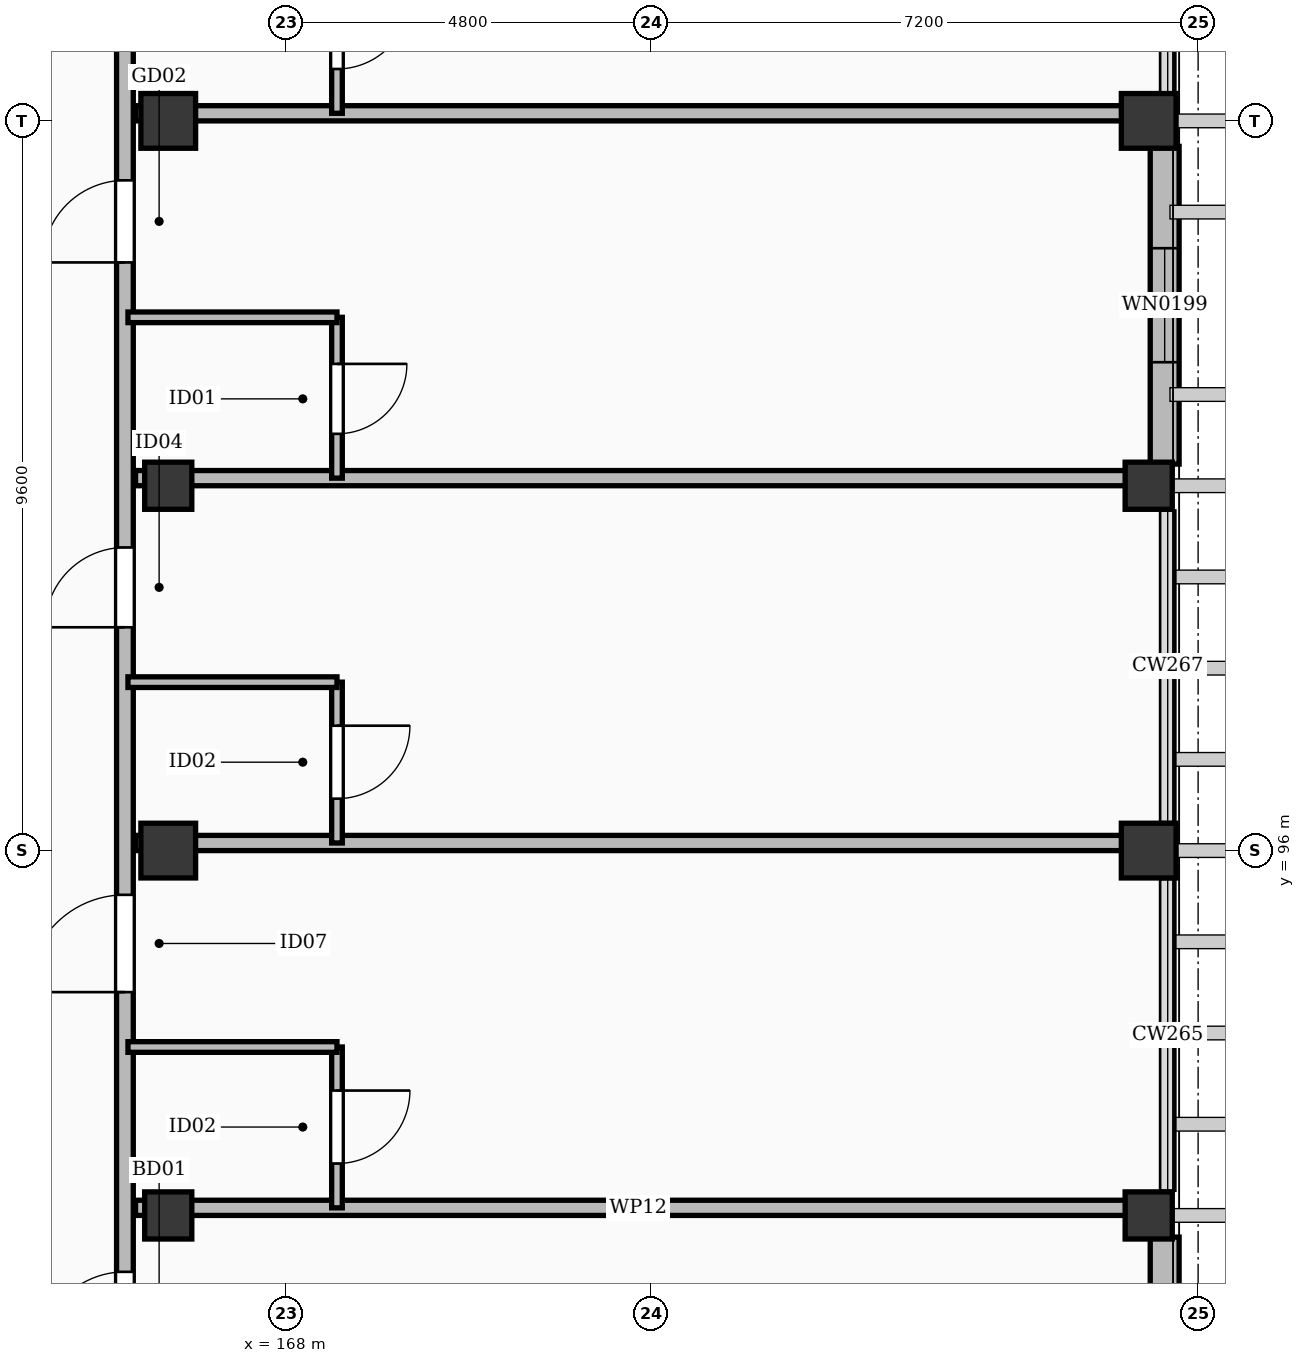
"""IFC4 building model, lengths in metres.
Left out: names, types, materials, properties, quantities, classifications, styles, units other than length and angle.
Written with IfcOpenShell. Run it as: python <this file> out.ifc"""

import sys

from ifc_helpers import new_model, si_unit, direction, frame, frame_2d, origin, origin_2d, place, context, subcontext, project, spatial, rectangle, extrude, element, fill, save


model = new_model("IFC4")
c1 = context("Model", 3, precision=1e-05, world=origin(), true_north=direction((0.0, 1.0)))
c2 = subcontext(c1, "Body", "Model", "MODEL_VIEW")
j1 = project(units=[si_unit("LENGTHUNIT", "METRE"), si_unit("PLANEANGLEUNIT", "RADIAN")], contexts=[c1])
p1 = place(None, origin())
s1 = spatial("IfcSite", under=j1, at=p1, CompositionType="ELEMENT")
p2 = place(p1, origin())
s2 = spatial("IfcBuilding", under=s1, at=p2, CompositionType="ELEMENT")
p3 = place(p2, frame((0.0, 0.0, 31.8)))
s3 = spatial("IfcBuildingStorey", under=s2, at=p3, CompositionType="ELEMENT", Elevation=31.8)
for number, where, z_axis, x_axis in (
    (1, (166.45, 96.0, 0.0), (0.0, 0.0, 1.0), (1.0, 0.0, 0.0)),
    (2, (166.45, 105.6, 0.0), (0.0, 0.0, 1.0), (1.0, 0.0, 0.0)),
    (3, (179.35, 96.0, 0.0), (0.0, 0.0, 1.0), (1.0, 0.0, 0.0)),
    (4, (179.35, 105.6, 0.0), (0.0, 0.0, 1.0), (1.0, 0.0, 0.0)),
):
    element("IfcColumn", number, at=place(p3, frame(where, z_axis=z_axis, x_axis=x_axis)), inside=s3, PredefinedType="COLUMN", context=c2, shape_type="SweptSolid", body=[
        extrude(rectangle(XDim=0.72, YDim=0.72, at=origin_2d()), origin(), (0.0, 0.0, 1.0), 3.6),
    ])
for number, where, z_axis, x_axis in (
    (5, (166.45, 91.2, 0.0), (0.0, 0.0, 1.0), (1.0, 0.0, 0.0)),
    (6, (166.45, 100.8, 0.0), (0.0, 0.0, 1.0), (1.0, 0.0, 0.0)),
    (7, (179.35, 91.2, 0.0), (0.0, 0.0, 1.0), (1.0, 0.0, 0.0)),
    (8, (179.35, 100.8, 0.0), (0.0, 0.0, 1.0), (1.0, 0.0, 0.0)),
):
    element("IfcColumn", number, at=place(p3, frame(where, z_axis=z_axis, x_axis=x_axis)), inside=s3, PredefinedType="COLUMN", context=c2, shape_type="SweptSolid", body=[
        extrude(rectangle(XDim=0.62, YDim=0.62, at=origin_2d()), origin(), (0.0, 0.0, 1.0), 3.6),
    ])
p4 = place(p3, frame((179.56, 90.915, 0.0), z_axis=(0.0, 0.0, 1.0), x_axis=(0.0, -1.0, 0.0)))
e9 = element("IfcWall", 9, at=p4, inside=s3, PredefinedType="SOLIDWALL", context=c2, shape_type="SweptSolid", body=[
    extrude(rectangle(XDim=4.18, YDim=0.38, at=frame_2d((2.09, 0.0))), origin(), (0.0, 0.0, 1.0), 2.602),
])
p5 = place(p4, frame((1.54, 0.0, 0.55)))
e10 = element("IfcOpeningElement", 10, at=p5, cuts=e9, PredefinedType="OPENING", context=c2, shape_type="SweptSolid", body=[
    extrude(rectangle(XDim=1.1, YDim=1.7, at=frame_2d((0.55, 0.85))), frame((0.0, 0.202, 0.0), z_axis=(0.0, -1.0, 0.0), x_axis=(1.0, 0.0, 0.0)), (0.0, 0.0, 1.0), 0.404),
])
p6 = place(p3, frame((179.56, 105.265, 0.0), z_axis=(0.0, 0.0, 1.0), x_axis=(0.0, -1.0, 0.0)))
e11 = element("IfcWall", 11, at=p6, inside=s3, PredefinedType="SOLIDWALL", context=c2, shape_type="SweptSolid", body=[
    extrude(rectangle(XDim=4.18, YDim=0.38, at=frame_2d((2.09, 0.0))), origin(), (0.0, 0.0, 1.0), 2.602),
])
p7 = place(p6, frame((1.34, 0.0, 0.55)))
e12 = element("IfcOpeningElement", 12, at=p7, cuts=e11, PredefinedType="OPENING", context=c2, shape_type="SweptSolid", body=[
    extrude(rectangle(XDim=1.5, YDim=1.74, at=frame_2d((0.75, 0.87))), frame((0.0, 0.202, 0.0), z_axis=(0.0, -1.0, 0.0), x_axis=(1.0, 0.0, 0.0)), (0.0, 0.0, 1.0), 0.404),
])
p8 = place(p3, frame((165.88, 48.35, 0.0), z_axis=(0.0, 0.0, 1.0), x_axis=(0.0, 1.0, 0.0)))
e13 = element("IfcWall", 13, at=p8, inside=s3, PredefinedType="PARTITIONING", context=c2, shape_type="SweptSolid", body=[
    extrude(rectangle(XDim=77.3, YDim=0.22, at=frame_2d((38.65, 0.0))), origin(), (0.0, 0.0, 1.0), 2.602),
])
p9 = place(p8, frame((5.15, 0.0, 0.0)))
e14 = element("IfcOpeningElement", 14, at=p9, cuts=e13, PredefinedType="OPENING", context=c2, shape_type="SweptSolid", body=[
    extrude(rectangle(XDim=1.14, YDim=2.26, at=frame_2d((0.57, 1.13))), frame((0.0, 0.122, 0.0), z_axis=(0.0, -1.0, 0.0), x_axis=(1.0, 0.0, 0.0)), (0.0, 0.0, 1.0), 0.244),
])
p10 = place(p8, frame((12.188, 0.0, 0.0)))
e15 = element("IfcOpeningElement", 15, at=p10, cuts=e13, PredefinedType="OPENING", context=c2, shape_type="SweptSolid", body=[
    extrude(rectangle(XDim=1.12, YDim=2.15, at=frame_2d((0.56, 1.075))), frame((0.0, 0.122, 0.0), z_axis=(0.0, -1.0, 0.0), x_axis=(1.0, 0.0, 0.0)), (0.0, 0.0, 1.0), 0.244),
])
p11 = place(p8, frame((16.988, 0.0, 0.0)))
e16 = element("IfcOpeningElement", 16, at=p11, cuts=e13, PredefinedType="OPENING", context=c2, shape_type="SweptSolid", body=[
    extrude(rectangle(XDim=1.28, YDim=2.16, at=frame_2d((0.64, 1.08))), frame((0.0, 0.122, 0.0), z_axis=(0.0, -1.0, 0.0), x_axis=(1.0, 0.0, 0.0)), (0.0, 0.0, 1.0), 0.244),
])
p12 = place(p8, frame((21.788, 0.0, 0.0)))
e17 = element("IfcOpeningElement", 17, at=p12, cuts=e13, PredefinedType="OPENING", context=c2, shape_type="SweptSolid", body=[
    extrude(rectangle(XDim=1.05, YDim=2.18, at=frame_2d((0.525, 1.09))), frame((0.0, 0.122, 0.0), z_axis=(0.0, -1.0, 0.0), x_axis=(1.0, 0.0, 0.0)), (0.0, 0.0, 1.0), 0.244),
])
p13 = place(p8, frame((26.588, 0.0, 0.0)))
e18 = element("IfcOpeningElement", 18, at=p13, cuts=e13, PredefinedType="OPENING", context=c2, shape_type="SweptSolid", body=[
    extrude(rectangle(XDim=1.08, YDim=2.25, at=frame_2d((0.54, 1.125))), frame((0.0, 0.122, 0.0), z_axis=(0.0, -1.0, 0.0), x_axis=(1.0, 0.0, 0.0)), (0.0, 0.0, 1.0), 0.244),
])
p14 = place(p8, frame((31.388, 0.0, 0.0)))
e19 = element("IfcOpeningElement", 19, at=p14, cuts=e13, PredefinedType="OPENING", context=c2, shape_type="SweptSolid", body=[
    extrude(rectangle(XDim=1.02, YDim=2.2, at=frame_2d((0.51, 1.1))), frame((0.0, 0.122, 0.0), z_axis=(0.0, -1.0, 0.0), x_axis=(1.0, 0.0, 0.0)), (0.0, 0.0, 1.0), 0.244),
])
p15 = place(p8, frame((35.838, 0.0, 0.0)))
e20 = element("IfcOpeningElement", 20, at=p15, cuts=e13, PredefinedType="OPENING", context=c2, shape_type="SweptSolid", body=[
    extrude(rectangle(XDim=1.5, YDim=2.3, at=frame_2d((0.75, 1.15))), frame((0.0, 0.122, 0.0), z_axis=(0.0, -1.0, 0.0), x_axis=(1.0, 0.0, 0.0)), (0.0, 0.0, 1.0), 0.244),
])
p16 = place(p8, frame((40.988, 0.0, 0.0)))
e21 = element("IfcOpeningElement", 21, at=p16, cuts=e13, PredefinedType="OPENING", context=c2, shape_type="SweptSolid", body=[
    extrude(rectangle(XDim=1.12, YDim=2.15, at=frame_2d((0.56, 1.075))), frame((0.0, 0.122, 0.0), z_axis=(0.0, -1.0, 0.0), x_axis=(1.0, 0.0, 0.0)), (0.0, 0.0, 1.0), 0.244),
])
p17 = place(p8, frame((45.788, 0.0, 0.0)))
e22 = element("IfcOpeningElement", 22, at=p17, cuts=e13, PredefinedType="OPENING", context=c2, shape_type="SweptSolid", body=[
    extrude(rectangle(XDim=1.28, YDim=2.16, at=frame_2d((0.64, 1.08))), frame((0.0, 0.122, 0.0), z_axis=(0.0, -1.0, 0.0), x_axis=(1.0, 0.0, 0.0)), (0.0, 0.0, 1.0), 0.244),
])
p18 = place(p8, frame((50.588, 0.0, 0.0)))
e23 = element("IfcOpeningElement", 23, at=p18, cuts=e13, PredefinedType="OPENING", context=c2, shape_type="SweptSolid", body=[
    extrude(rectangle(XDim=1.05, YDim=2.18, at=frame_2d((0.525, 1.09))), frame((0.0, 0.122, 0.0), z_axis=(0.0, -1.0, 0.0), x_axis=(1.0, 0.0, 0.0)), (0.0, 0.0, 1.0), 0.244),
])
p19 = place(p8, frame((55.388, 0.0, 0.0)))
e24 = element("IfcOpeningElement", 24, at=p19, cuts=e13, PredefinedType="OPENING", context=c2, shape_type="SweptSolid", body=[
    extrude(rectangle(XDim=1.08, YDim=2.25, at=frame_2d((0.54, 1.125))), frame((0.0, 0.122, 0.0), z_axis=(0.0, -1.0, 0.0), x_axis=(1.0, 0.0, 0.0)), (0.0, 0.0, 1.0), 0.244),
])
p20 = place(p8, frame((60.188, 0.0, 0.0)))
e25 = element("IfcOpeningElement", 25, at=p20, cuts=e13, PredefinedType="OPENING", context=c2, shape_type="SweptSolid", body=[
    extrude(rectangle(XDim=1.02, YDim=2.2, at=frame_2d((0.51, 1.1))), frame((0.0, 0.122, 0.0), z_axis=(0.0, -1.0, 0.0), x_axis=(1.0, 0.0, 0.0)), (0.0, 0.0, 1.0), 0.244),
])
p21 = place(p8, frame((64.638, 0.0, 0.0)))
e26 = element("IfcOpeningElement", 26, at=p21, cuts=e13, PredefinedType="OPENING", context=c2, shape_type="SweptSolid", body=[
    extrude(rectangle(XDim=1.5, YDim=2.3, at=frame_2d((0.75, 1.15))), frame((0.0, 0.122, 0.0), z_axis=(0.0, -1.0, 0.0), x_axis=(1.0, 0.0, 0.0)), (0.0, 0.0, 1.0), 0.244),
])
p22 = place(p8, frame((69.788, 0.0, 0.0)))
e27 = element("IfcOpeningElement", 27, at=p22, cuts=e13, PredefinedType="OPENING", context=c2, shape_type="SweptSolid", body=[
    extrude(rectangle(XDim=1.12, YDim=2.15, at=frame_2d((0.56, 1.075))), frame((0.0, 0.122, 0.0), z_axis=(0.0, -1.0, 0.0), x_axis=(1.0, 0.0, 0.0)), (0.0, 0.0, 1.0), 0.244),
])
p23 = place(p8, frame((74.588, 0.0, 0.0)))
e28 = element("IfcOpeningElement", 28, at=p23, cuts=e13, PredefinedType="OPENING", context=c2, shape_type="SweptSolid", body=[
    extrude(rectangle(XDim=1.28, YDim=2.16, at=frame_2d((0.64, 1.08))), frame((0.0, 0.122, 0.0), z_axis=(0.0, -1.0, 0.0), x_axis=(1.0, 0.0, 0.0)), (0.0, 0.0, 1.0), 0.244),
])
p24 = place(p3, frame((166.02, 91.3, 0.0), z_axis=(0.0, 0.0, 1.0), x_axis=(1.0, 0.0, 0.0)))
e29 = element("IfcWall", 29, at=p24, inside=s3, PredefinedType="PARTITIONING", context=c2, shape_type="SweptSolid", body=[
    extrude(rectangle(XDim=13.23, YDim=0.2, at=frame_2d((6.615, 0.0))), origin(), (0.0, 0.0, 1.0), 2.602),
])
p25 = place(p3, frame((168.67, 91.3, 0.0), z_axis=(0.0, 0.0, 1.0), x_axis=(0.0, 1.0, 0.0)))
e30 = element("IfcWall", 30, at=p25, inside=s3, PredefinedType="PARTITIONING", context=c2, shape_type="SweptSolid", body=[
    extrude(rectangle(XDim=2.116, YDim=0.14, at=frame_2d((1.058, 0.0))), origin(), (0.0, 0.0, 1.0), 2.732),
])
p26 = place(p25, frame((0.583, 0.0, 0.0)))
e31 = element("IfcOpeningElement", 31, at=p26, cuts=e30, PredefinedType="OPENING", context=c2, shape_type="SweptSolid", body=[
    extrude(rectangle(XDim=0.96, YDim=2.12, at=frame_2d((0.48, 1.06))), frame((0.0, 0.082, 0.0), z_axis=(0.0, -1.0, 0.0), x_axis=(1.0, 0.0, 0.0)), (0.0, 0.0, 1.0), 0.164),
])
p27 = place(p3, frame((165.92, 93.416, 0.0), z_axis=(0.0, 0.0, 1.0), x_axis=(1.0, 0.0, 0.0)))
e32 = element("IfcWall", 32, at=p27, inside=s3, PredefinedType="PARTITIONING", context=c2, shape_type="SweptSolid", body=[
    extrude(rectangle(XDim=2.75, YDim=0.14, at=frame_2d((1.375, 0.0))), origin(), (0.0, 0.0, 1.0), 2.732),
])
p28 = place(p3, frame((166.02, 96.1, 0.0), z_axis=(0.0, 0.0, 1.0), x_axis=(1.0, 0.0, 0.0)))
e33 = element("IfcWall", 33, at=p28, inside=s3, PredefinedType="PARTITIONING", context=c2, shape_type="SweptSolid", body=[
    extrude(rectangle(XDim=13.23, YDim=0.2, at=frame_2d((6.615, 0.0))), origin(), (0.0, 0.0, 1.0), 2.602),
])
p29 = place(p3, frame((168.67, 96.1, 0.0), z_axis=(0.0, 0.0, 1.0), x_axis=(0.0, 1.0, 0.0)))
e34 = element("IfcWall", 34, at=p29, inside=s3, PredefinedType="PARTITIONING", context=c2, shape_type="SweptSolid", body=[
    extrude(rectangle(XDim=2.116, YDim=0.14, at=frame_2d((1.058, 0.0))), origin(), (0.0, 0.0, 1.0), 2.732),
])
p30 = place(p29, frame((0.583, 0.0, 0.0)))
e35 = element("IfcOpeningElement", 35, at=p30, cuts=e34, PredefinedType="OPENING", context=c2, shape_type="SweptSolid", body=[
    extrude(rectangle(XDim=0.96, YDim=2.12, at=frame_2d((0.48, 1.06))), frame((0.0, 0.082, 0.0), z_axis=(0.0, -1.0, 0.0), x_axis=(1.0, 0.0, 0.0)), (0.0, 0.0, 1.0), 0.164),
])
p31 = place(p3, frame((165.92, 98.216, 0.0), z_axis=(0.0, 0.0, 1.0), x_axis=(1.0, 0.0, 0.0)))
e36 = element("IfcWall", 36, at=p31, inside=s3, PredefinedType="PARTITIONING", context=c2, shape_type="SweptSolid", body=[
    extrude(rectangle(XDim=2.75, YDim=0.14, at=frame_2d((1.375, 0.0))), origin(), (0.0, 0.0, 1.0), 2.732),
])
p32 = place(p3, frame((166.02, 100.9, 0.0), z_axis=(0.0, 0.0, 1.0), x_axis=(1.0, 0.0, 0.0)))
e37 = element("IfcWall", 37, at=p32, inside=s3, PredefinedType="PARTITIONING", context=c2, shape_type="SweptSolid", body=[
    extrude(rectangle(XDim=13.23, YDim=0.2, at=frame_2d((6.615, 0.0))), origin(), (0.0, 0.0, 1.0), 2.602),
])
p33 = place(p3, frame((168.67, 100.9, 0.0), z_axis=(0.0, 0.0, 1.0), x_axis=(0.0, 1.0, 0.0)))
e38 = element("IfcWall", 38, at=p33, inside=s3, PredefinedType="PARTITIONING", context=c2, shape_type="SweptSolid", body=[
    extrude(rectangle(XDim=2.116, YDim=0.14, at=frame_2d((1.058, 0.0))), origin(), (0.0, 0.0, 1.0), 2.732),
])
p34 = place(p33, frame((0.583, 0.0, 0.0)))
e39 = element("IfcOpeningElement", 39, at=p34, cuts=e38, PredefinedType="OPENING", context=c2, shape_type="SweptSolid", body=[
    extrude(rectangle(XDim=0.92, YDim=2.1, at=frame_2d((0.46, 1.05))), frame((0.0, 0.082, 0.0), z_axis=(0.0, -1.0, 0.0), x_axis=(1.0, 0.0, 0.0)), (0.0, 0.0, 1.0), 0.164),
])
p35 = place(p3, frame((165.92, 103.016, 0.0), z_axis=(0.0, 0.0, 1.0), x_axis=(1.0, 0.0, 0.0)))
e40 = element("IfcWall", 40, at=p35, inside=s3, PredefinedType="PARTITIONING", context=c2, shape_type="SweptSolid", body=[
    extrude(rectangle(XDim=2.75, YDim=0.14, at=frame_2d((1.375, 0.0))), origin(), (0.0, 0.0, 1.0), 2.732),
])
p36 = place(p3, frame((166.02, 105.7, 0.0), z_axis=(0.0, 0.0, 1.0), x_axis=(1.0, 0.0, 0.0)))
e41 = element("IfcWall", 41, at=p36, inside=s3, PredefinedType="PARTITIONING", context=c2, shape_type="SweptSolid", body=[
    extrude(rectangle(XDim=13.23, YDim=0.2, at=frame_2d((6.615, 0.0))), origin(), (0.0, 0.0, 1.0), 2.602),
])
p37 = place(p3, frame((168.67, 105.7, 0.0), z_axis=(0.0, 0.0, 1.0), x_axis=(0.0, 1.0, 0.0)))
e42 = element("IfcWall", 42, at=p37, inside=s3, PredefinedType="PARTITIONING", context=c2, shape_type="SweptSolid", body=[
    extrude(rectangle(XDim=2.116, YDim=0.14, at=frame_2d((1.058, 0.0))), origin(), (0.0, 0.0, 1.0), 2.732),
])
p38 = place(p37, frame((0.583, 0.0, 0.0)))
e43 = element("IfcOpeningElement", 43, at=p38, cuts=e42, PredefinedType="OPENING", context=c2, shape_type="SweptSolid", body=[
    extrude(rectangle(XDim=0.96, YDim=2.12, at=frame_2d((0.48, 1.06))), frame((0.0, 0.082, 0.0), z_axis=(0.0, -1.0, 0.0), x_axis=(1.0, 0.0, 0.0)), (0.0, 0.0, 1.0), 0.164),
])
p39 = place(p7, origin())
e44 = element("IfcWindow", 44, at=p39, inside=s3, PartitioningType="SINGLE_PANEL", PredefinedType="WINDOW", context=c2, shape_type="SweptSolid", body=[
    extrude(rectangle(XDim=1.5, YDim=1.74, at=frame_2d((0.75, 0.87))), frame((0.0, 0.03, 0.0), z_axis=(0.0, -1.0, 0.0), x_axis=(1.0, 0.0, 0.0)), (0.0, 0.0, 1.0), 0.06),
])
fill(e12, e44)
p40 = place(p16, origin())
e45 = element("IfcDoor", 45, at=p40, inside=s3, OperationType="SINGLE_SWING_LEFT", PredefinedType="DOOR", context=c2, shape_type="SweptSolid", body=[
    extrude(rectangle(XDim=1.12, YDim=2.15, at=frame_2d((0.56, 1.075))), frame((0.0, 0.025, 0.0), z_axis=(0.0, -1.0, 0.0), x_axis=(1.0, 0.0, 0.0)), (0.0, 0.0, 1.0), 0.05),
])
fill(e21, e45)
p41 = place(p17, origin())
e46 = element("IfcDoor", 46, at=p41, inside=s3, OperationType="SINGLE_SWING_LEFT", PredefinedType="DOOR", context=c2, shape_type="SweptSolid", body=[
    extrude(rectangle(XDim=1.28, YDim=2.16, at=frame_2d((0.64, 1.08))), frame((0.0, 0.025, 0.0), z_axis=(0.0, -1.0, 0.0), x_axis=(1.0, 0.0, 0.0)), (0.0, 0.0, 1.0), 0.05),
])
fill(e22, e46)
p42 = place(p26, frame((0.96, 0.0, 0.0), z_axis=(0.0, 0.0, 1.0), x_axis=(-1.0, 0.0, 0.0)))
e47 = element("IfcDoor", 47, at=p42, inside=s3, OperationType="SINGLE_SWING_RIGHT", PredefinedType="DOOR", context=c2, shape_type="SweptSolid", body=[
    extrude(rectangle(XDim=0.96, YDim=2.12, at=frame_2d((0.48, 1.06))), frame((0.0, 0.025, 0.0), z_axis=(0.0, -1.0, 0.0), x_axis=(1.0, 0.0, 0.0)), (0.0, 0.0, 1.0), 0.05),
])
fill(e31, e47)
p43 = place(p18, origin())
e48 = element("IfcDoor", 48, at=p43, inside=s3, OperationType="SINGLE_SWING_LEFT", PredefinedType="DOOR", context=c2, shape_type="SweptSolid", body=[
    extrude(rectangle(XDim=1.05, YDim=2.18, at=frame_2d((0.525, 1.09))), frame((0.0, 0.025, 0.0), z_axis=(0.0, -1.0, 0.0), x_axis=(1.0, 0.0, 0.0)), (0.0, 0.0, 1.0), 0.05),
])
fill(e23, e48)
p44 = place(p30, frame((0.96, 0.0, 0.0), z_axis=(0.0, 0.0, 1.0), x_axis=(-1.0, 0.0, 0.0)))
e49 = element("IfcDoor", 49, at=p44, inside=s3, OperationType="SINGLE_SWING_RIGHT", PredefinedType="DOOR", context=c2, shape_type="SweptSolid", body=[
    extrude(rectangle(XDim=0.96, YDim=2.12, at=frame_2d((0.48, 1.06))), frame((0.0, 0.025, 0.0), z_axis=(0.0, -1.0, 0.0), x_axis=(1.0, 0.0, 0.0)), (0.0, 0.0, 1.0), 0.05),
])
fill(e35, e49)
p45 = place(p19, origin())
e50 = element("IfcDoor", 50, at=p45, inside=s3, OperationType="SINGLE_SWING_LEFT", PredefinedType="DOOR", context=c2, shape_type="SweptSolid", body=[
    extrude(rectangle(XDim=1.08, YDim=2.25, at=frame_2d((0.54, 1.125))), frame((0.0, 0.025, 0.0), z_axis=(0.0, -1.0, 0.0), x_axis=(1.0, 0.0, 0.0)), (0.0, 0.0, 1.0), 0.05),
])
fill(e24, e50)
p46 = place(p34, frame((0.92, 0.0, 0.0), z_axis=(0.0, 0.0, 1.0), x_axis=(-1.0, 0.0, 0.0)))
e51 = element("IfcDoor", 51, at=p46, inside=s3, OperationType="SINGLE_SWING_RIGHT", PredefinedType="DOOR", context=c2, shape_type="SweptSolid", body=[
    extrude(rectangle(XDim=0.92, YDim=2.1, at=frame_2d((0.46, 1.05))), frame((0.0, 0.025, 0.0), z_axis=(0.0, -1.0, 0.0), x_axis=(1.0, 0.0, 0.0)), (0.0, 0.0, 1.0), 0.05),
])
fill(e39, e51)
p47 = place(p38, frame((0.96, 0.0, 0.0), z_axis=(0.0, 0.0, 1.0), x_axis=(-1.0, 0.0, 0.0)))
e52 = element("IfcDoor", 52, at=p47, inside=s3, OperationType="SINGLE_SWING_RIGHT", PredefinedType="DOOR", context=c2, shape_type="SweptSolid", body=[
    extrude(rectangle(XDim=0.96, YDim=2.12, at=frame_2d((0.48, 1.06))), frame((0.0, 0.025, 0.0), z_axis=(0.0, -1.0, 0.0), x_axis=(1.0, 0.0, 0.0)), (0.0, 0.0, 1.0), 0.05),
])
fill(e43, e52)
save(model, sys.argv[1])
